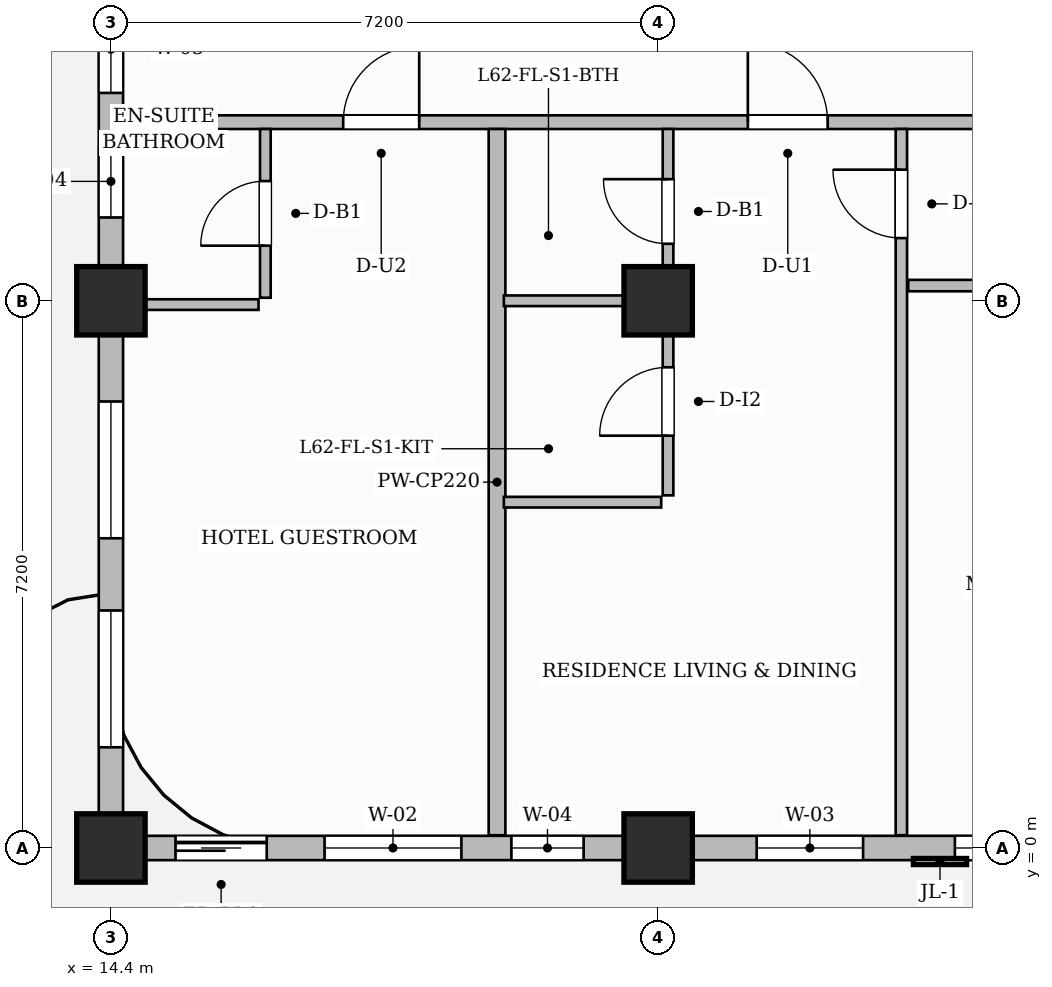
"""IFC4 building model, lengths in metres.
Left out: names, types, materials, properties, quantities, classifications, styles, units other than length and angle.
Written with IfcOpenShell. Run it as: python <this file> out.ifc"""

import sys

from ifc_helpers import new_model, si_unit, direction, frame, frame_2d, origin, origin_2d, place, context, subcontext, project, spatial, rectangle, extrude, source, transform, mapped, element, fill, save


model = new_model("IFC4")
c1 = context("Model", 3, precision=1e-05, world=origin(), true_north=direction((0.0, 1.0)))
c2 = subcontext(c1, "Body", "Model", "MODEL_VIEW")
j1 = project(units=[si_unit("LENGTHUNIT", "METRE"), si_unit("PLANEANGLEUNIT", "RADIAN")], contexts=[c1])
p1 = place(None, origin())
s1 = spatial("IfcSite", under=j1, at=p1, CompositionType="ELEMENT")
p2 = place(p1, origin())
s2 = spatial("IfcBuilding", under=s1, at=p2, CompositionType="ELEMENT")
p3 = place(p2, frame((0.0, 0.0, 248.1)))
s3 = spatial("IfcBuildingStorey", under=s2, at=p3, CompositionType="ELEMENT", Elevation=248.1)
m1 = source(origin(), c2, "Body", "SweptSolid", [
    extrude(rectangle(XDim=0.9, YDim=0.9, at=origin_2d()), origin(), (0.0, 0.0, 1.0), 3.85),
])
for number, where, z_axis, x_axis in (
    (1, (14.4, 0.0, 0.0), (0.0, 0.0, 1.0), (1.0, 0.0, 0.0)),
    (2, (14.4, 7.2, 0.0), (0.0, 0.0, 1.0), (1.0, 0.0, 0.0)),
    (3, (21.6, 0.0, 0.0), (0.0, 0.0, 1.0), (1.0, 0.0, 0.0)),
    (4, (21.6, 7.2, 0.0), (0.0, 0.0, 1.0), (1.0, 0.0, 0.0)),
):
    element("IfcColumn", number, at=place(p3, frame(where, z_axis=z_axis, x_axis=x_axis)), inside=s3, PredefinedType="COLUMN", context=c2, shape_type="MappedRepresentation", body=[
        mapped(m1, transform((0.0, 0.0, 0.0), scale=1.0)),
    ])
p4 = place(p3, frame((14.568, 9.55, 0.0), z_axis=(0.0, 0.0, 1.0), x_axis=(1.0, 0.0, 0.0)))
e5 = element("IfcWall", 5, at=p4, inside=s3, PredefinedType="PARTITIONING", context=c2, shape_type="SweptSolid", body=[
    extrude(rectangle(XDim=15.542, YDim=0.18, at=frame_2d((7.771, 0.0))), origin(), (0.0, 0.0, 1.0), 3.6),
])
p5 = place(p4, frame((2.888, 0.0, 0.0)))
e6 = element("IfcOpeningElement", 6, at=p5, cuts=e5, PredefinedType="OPENING", context=c2, shape_type="SweptSolid", body=[
    extrude(rectangle(XDim=1.0, YDim=2.2, at=frame_2d((0.5, 1.1))), frame((0.0, 0.1, 0.0), z_axis=(0.0, -1.0, 0.0), x_axis=(1.0, 0.0, 0.0)), (0.0, 0.0, 1.0), 0.2),
])
p6 = place(p4, frame((8.212, 0.0, 0.0)))
e7 = element("IfcOpeningElement", 7, at=p6, cuts=e5, PredefinedType="OPENING", context=c2, shape_type="SweptSolid", body=[
    extrude(rectangle(XDim=1.05, YDim=2.25, at=frame_2d((0.525, 1.125))), frame((0.0, 0.1, 0.0), z_axis=(0.0, -1.0, 0.0), x_axis=(1.0, 0.0, 0.0)), (0.0, 0.0, 1.0), 0.2),
])
p7 = place(p3, frame((19.48, 0.168, 0.0), z_axis=(0.0, 0.0, 1.0), x_axis=(0.0, 1.0, 0.0)))
e8 = element("IfcWall", 8, at=p7, inside=s3, PredefinedType="PARTITIONING", context=c2, shape_type="SweptSolid", body=[
    extrude(rectangle(XDim=9.292, YDim=0.22, at=frame_2d((4.646, 0.0))), origin(), (0.0, 0.0, 1.0), 3.6),
])
p8 = place(p3, frame((16.432, 7.24, 0.0), z_axis=(0.0, 0.0, 1.0), x_axis=(0.0, 1.0, 0.0)))
e9 = element("IfcWall", 9, at=p8, inside=s3, PredefinedType="PARTITIONING", context=c2, shape_type="SweptSolid", body=[
    extrude(rectangle(XDim=2.22, YDim=0.14, at=frame_2d((1.11, 0.0))), origin(), (0.0, 0.0, 1.0), 3.6),
])
p9 = place(p8, frame((0.685, 0.0, 0.0)))
e10 = element("IfcOpeningElement", 10, at=p9, cuts=e9, PredefinedType="OPENING", context=c2, shape_type="SweptSolid", body=[
    extrude(rectangle(XDim=0.85, YDim=2.1, at=frame_2d((0.425, 1.05))), frame((0.0, 0.08, 0.0), z_axis=(0.0, -1.0, 0.0), x_axis=(1.0, 0.0, 0.0)), (0.0, 0.0, 1.0), 0.16),
])
p10 = place(p3, frame((14.49, 7.15, 0.0), z_axis=(0.0, 0.0, 1.0), x_axis=(1.0, 0.0, 0.0)))
e11 = element("IfcWall", 11, at=p10, inside=s3, PredefinedType="PARTITIONING", context=c2, shape_type="SweptSolid", body=[
    extrude(rectangle(XDim=1.852, YDim=0.14, at=frame_2d((0.926, 0.0))), origin(), (0.0, 0.0, 1.0), 2.035),
])
p11 = place(p3, frame((21.73, 4.64, 0.0), z_axis=(0.0, 0.0, 1.0), x_axis=(0.0, 1.0, 0.0)))
e12 = element("IfcWall", 12, at=p11, inside=s3, PredefinedType="PARTITIONING", context=c2, shape_type="SweptSolid", body=[
    extrude(rectangle(XDim=4.82, YDim=0.14, at=frame_2d((2.41, 0.0))), origin(), (0.0, 0.0, 1.0), 3.135),
])
p12 = place(p11, frame((0.785, 0.0, 0.0)))
e13 = element("IfcOpeningElement", 13, at=p12, cuts=e12, PredefinedType="OPENING", context=c2, shape_type="SweptSolid", body=[
    extrude(rectangle(XDim=0.9, YDim=2.15, at=frame_2d((0.45, 1.075))), frame((0.0, 0.08, 0.0), z_axis=(0.0, -1.0, 0.0), x_axis=(1.0, 0.0, 0.0)), (0.0, 0.0, 1.0), 0.16),
])
p13 = place(p11, frame((3.31, 0.0, 0.0)))
e14 = element("IfcOpeningElement", 14, at=p13, cuts=e12, PredefinedType="OPENING", context=c2, shape_type="SweptSolid", body=[
    extrude(rectangle(XDim=0.85, YDim=2.1, at=frame_2d((0.425, 1.05))), frame((0.0, 0.08, 0.0), z_axis=(0.0, -1.0, 0.0), x_axis=(1.0, 0.0, 0.0)), (0.0, 0.0, 1.0), 0.16),
])
p14 = place(p3, frame((19.57, 7.2, 0.0), z_axis=(0.0, 0.0, 1.0), x_axis=(1.0, 0.0, 0.0)))
e15 = element("IfcWall", 15, at=p14, inside=s3, PredefinedType="PARTITIONING", context=c2, shape_type="SweptSolid", body=[
    extrude(rectangle(XDim=2.07, YDim=0.14, at=frame_2d((1.035, 0.0))), origin(), (0.0, 0.0, 1.0), 2.035),
])
p15 = place(p3, frame((19.57, 4.55, 0.0), z_axis=(0.0, 0.0, 1.0), x_axis=(1.0, 0.0, 0.0)))
e16 = element("IfcWall", 16, at=p15, inside=s3, PredefinedType="PARTITIONING", context=c2, shape_type="SweptSolid", body=[
    extrude(rectangle(XDim=2.07, YDim=0.14, at=frame_2d((1.035, 0.0))), origin(), (0.0, 0.0, 1.0), 3.6),
])
p16 = place(p3, frame((24.8, 0.168, 0.0), z_axis=(0.0, 0.0, 1.0), x_axis=(0.0, 1.0, 0.0)))
e17 = element("IfcWall", 17, at=p16, inside=s3, PredefinedType="PARTITIONING", context=c2, shape_type="SweptSolid", body=[
    extrude(rectangle(XDim=9.292, YDim=0.15, at=frame_2d((4.646, 0.0))), origin(), (0.0, 0.0, 1.0), 3.6),
])
p17 = place(p16, frame((7.857, 0.0, 0.0)))
e18 = element("IfcOpeningElement", 18, at=p17, cuts=e17, PredefinedType="OPENING", context=c2, shape_type="SweptSolid", body=[
    extrude(rectangle(XDim=0.9, YDim=2.15, at=frame_2d((0.45, 1.075))), frame((0.0, 0.085, 0.0), z_axis=(0.0, -1.0, 0.0), x_axis=(1.0, 0.0, 0.0)), (0.0, 0.0, 1.0), 0.17),
])
p18 = place(p3, frame((24.89, 7.4, 0.0), z_axis=(0.0, 0.0, 1.0), x_axis=(1.0, 0.0, 0.0)))
e19 = element("IfcWall", 19, at=p18, inside=s3, PredefinedType="PARTITIONING", context=c2, shape_type="SweptSolid", body=[
    extrude(rectangle(XDim=5.22, YDim=0.15, at=frame_2d((2.61, 0.0))), origin(), (0.0, 0.0, 1.0), 3.135),
])
p19 = place(p18, frame((1.11, 0.0, 0.0)))
e20 = element("IfcOpeningElement", 20, at=p19, cuts=e19, PredefinedType="OPENING", context=c2, shape_type="SweptSolid", body=[
    extrude(rectangle(XDim=0.9, YDim=2.15, at=frame_2d((0.45, 1.075))), frame((0.0, 0.085, 0.0), z_axis=(0.0, -1.0, 0.0), x_axis=(1.0, 0.0, 0.0)), (0.0, 0.0, 1.0), 0.17),
])
p20 = place(p3, frame((14.4, 0.0, 0.0), z_axis=(0.0, 0.0, 1.0), x_axis=(1.0, 0.0, 0.0)))
e21 = element("IfcWall", 21, at=p20, inside=s3, PredefinedType="SOLIDWALL", context=c2, shape_type="SweptSolid", body=[
    extrude(rectangle(XDim=35.4, YDim=0.32, at=frame_2d((17.7, 0.0))), origin(), (0.0, 0.0, 1.0), 3.135),
])
p21 = place(p20, frame((0.85, 0.0, 0.0)))
e22 = element("IfcOpeningElement", 22, at=p21, cuts=e21, PredefinedType="OPENING", context=c2, shape_type="SweptSolid", body=[
    extrude(rectangle(XDim=1.2, YDim=2.2, at=frame_2d((0.6, 1.1))), frame((0.0, 0.17, 0.0), z_axis=(0.0, -1.0, 0.0), x_axis=(1.0, 0.0, 0.0)), (0.0, 0.0, 1.0), 0.34),
])
p22 = place(p20, frame((2.811, 0.0, 0.8)))
e23 = element("IfcOpeningElement", 23, at=p22, cuts=e21, PredefinedType="OPENING", context=c2, shape_type="SweptSolid", body=[
    extrude(rectangle(XDim=1.8, YDim=1.85, at=frame_2d((0.9, 0.925))), frame((0.0, 0.17, 0.0), z_axis=(0.0, -1.0, 0.0), x_axis=(1.0, 0.0, 0.0)), (0.0, 0.0, 1.0), 0.34),
])
p23 = place(p20, frame((5.269, 0.0, 0.8)))
e24 = element("IfcOpeningElement", 24, at=p23, cuts=e21, PredefinedType="OPENING", context=c2, shape_type="SweptSolid", body=[
    extrude(rectangle(XDim=0.95, YDim=1.75, at=frame_2d((0.475, 0.875))), frame((0.0, 0.17, 0.0), z_axis=(0.0, -1.0, 0.0), x_axis=(1.0, 0.0, 0.0)), (0.0, 0.0, 1.0), 0.34),
])
p24 = place(p20, frame((8.496, 0.0, 0.8)))
e25 = element("IfcOpeningElement", 25, at=p24, cuts=e21, PredefinedType="OPENING", context=c2, shape_type="SweptSolid", body=[
    extrude(rectangle(XDim=1.4, YDim=1.85, at=frame_2d((0.7, 0.925))), frame((0.0, 0.17, 0.0), z_axis=(0.0, -1.0, 0.0), x_axis=(1.0, 0.0, 0.0)), (0.0, 0.0, 1.0), 0.34),
])
p25 = place(p20, frame((11.104, 0.0, 0.8)))
e26 = element("IfcOpeningElement", 26, at=p25, cuts=e21, PredefinedType="OPENING", context=c2, shape_type="SweptSolid", body=[
    extrude(rectangle(XDim=1.8, YDim=1.85, at=frame_2d((0.9, 0.925))), frame((0.0, 0.17, 0.0), z_axis=(0.0, -1.0, 0.0), x_axis=(1.0, 0.0, 0.0)), (0.0, 0.0, 1.0), 0.34),
])
p26 = place(p20, frame((16.804, 0.0, 0.8)))
e27 = element("IfcOpeningElement", 27, at=p26, cuts=e21, PredefinedType="OPENING", context=c2, shape_type="SweptSolid", body=[
    extrude(rectangle(XDim=1.8, YDim=1.85, at=frame_2d((0.9, 0.925))), frame((0.0, 0.17, 0.0), z_axis=(0.0, -1.0, 0.0), x_axis=(1.0, 0.0, 0.0)), (0.0, 0.0, 1.0), 0.34),
])
p27 = place(p20, frame((21.725, 0.0, 0.8)))
e28 = element("IfcOpeningElement", 28, at=p27, cuts=e21, PredefinedType="OPENING", context=c2, shape_type="SweptSolid", body=[
    extrude(rectangle(XDim=1.8, YDim=1.85, at=frame_2d((0.9, 0.925))), frame((0.0, 0.17, 0.0), z_axis=(0.0, -1.0, 0.0), x_axis=(1.0, 0.0, 0.0)), (0.0, 0.0, 1.0), 0.34),
])
p28 = place(p20, frame((24.475, 0.0, 0.8)))
e29 = element("IfcOpeningElement", 29, at=p28, cuts=e21, PredefinedType="OPENING", context=c2, shape_type="SweptSolid", body=[
    extrude(rectangle(XDim=1.8, YDim=1.85, at=frame_2d((0.9, 0.925))), frame((0.0, 0.17, 0.0), z_axis=(0.0, -1.0, 0.0), x_axis=(1.0, 0.0, 0.0)), (0.0, 0.0, 1.0), 0.34),
])
p29 = place(p20, frame((29.075, 0.0, 0.8)))
e30 = element("IfcOpeningElement", 30, at=p29, cuts=e21, PredefinedType="OPENING", context=c2, shape_type="SweptSolid", body=[
    extrude(rectangle(XDim=1.8, YDim=1.85, at=frame_2d((0.9, 0.925))), frame((0.0, 0.17, 0.0), z_axis=(0.0, -1.0, 0.0), x_axis=(1.0, 0.0, 0.0)), (0.0, 0.0, 1.0), 0.34),
])
p30 = place(p20, frame((32.125, 0.0, 0.8)))
e31 = element("IfcOpeningElement", 31, at=p30, cuts=e21, PredefinedType="OPENING", context=c2, shape_type="SweptSolid", body=[
    extrude(rectangle(XDim=1.8, YDim=1.85, at=frame_2d((0.9, 0.925))), frame((0.0, 0.17, 0.0), z_axis=(0.0, -1.0, 0.0), x_axis=(1.0, 0.0, 0.0)), (0.0, 0.0, 1.0), 0.34),
])
p31 = place(p3, frame((14.4, 0.05, 0.0), z_axis=(0.0, 0.0, 1.0), x_axis=(0.0, 1.0, 0.0)))
e32 = element("IfcWall", 32, at=p31, inside=s3, PredefinedType="SOLIDWALL", context=c2, shape_type="SweptSolid", body=[
    extrude(rectangle(XDim=21.5, YDim=0.32, at=frame_2d((10.75, 0.0))), origin(), (0.0, 0.0, 1.0), 3.6),
])
p32 = place(p31, frame((1.275, 0.0, 0.8)))
e33 = element("IfcOpeningElement", 33, at=p32, cuts=e32, PredefinedType="OPENING", context=c2, shape_type="SweptSolid", body=[
    extrude(rectangle(XDim=1.8, YDim=1.85, at=frame_2d((0.9, 0.925))), frame((0.0, 0.17, 0.0), z_axis=(0.0, -1.0, 0.0), x_axis=(1.0, 0.0, 0.0)), (0.0, 0.0, 1.0), 0.34),
])
p33 = place(p31, frame((4.025, 0.0, 0.8)))
e34 = element("IfcOpeningElement", 34, at=p33, cuts=e32, PredefinedType="OPENING", context=c2, shape_type="SweptSolid", body=[
    extrude(rectangle(XDim=1.8, YDim=1.85, at=frame_2d((0.9, 0.925))), frame((0.0, 0.17, 0.0), z_axis=(0.0, -1.0, 0.0), x_axis=(1.0, 0.0, 0.0)), (0.0, 0.0, 1.0), 0.34),
])
p34 = place(p31, frame((8.246, 0.0, 0.8)))
e35 = element("IfcOpeningElement", 35, at=p34, cuts=e32, PredefinedType="OPENING", context=c2, shape_type="SweptSolid", body=[
    extrude(rectangle(XDim=0.95, YDim=1.75, at=frame_2d((0.475, 0.875))), frame((0.0, 0.17, 0.0), z_axis=(0.0, -1.0, 0.0), x_axis=(1.0, 0.0, 0.0)), (0.0, 0.0, 1.0), 0.34),
])
p35 = place(p31, frame((9.885, 0.0, 0.8)))
e36 = element("IfcOpeningElement", 36, at=p35, cuts=e32, PredefinedType="OPENING", context=c2, shape_type="SweptSolid", body=[
    extrude(rectangle(XDim=1.15, YDim=1.8, at=frame_2d((0.575, 0.9))), frame((0.0, 0.17, 0.0), z_axis=(0.0, -1.0, 0.0), x_axis=(1.0, 0.0, 0.0)), (0.0, 0.0, 1.0), 0.34),
])
p36 = place(p31, frame((11.789, 0.0, 0.8)))
e37 = element("IfcOpeningElement", 37, at=p36, cuts=e32, PredefinedType="OPENING", context=c2, shape_type="SweptSolid", body=[
    extrude(rectangle(XDim=1.4, YDim=1.85, at=frame_2d((0.7, 0.925))), frame((0.0, 0.17, 0.0), z_axis=(0.0, -1.0, 0.0), x_axis=(1.0, 0.0, 0.0)), (0.0, 0.0, 1.0), 0.34),
])
p37 = place(p31, frame((15.675, 0.0, 0.8)))
e38 = element("IfcOpeningElement", 38, at=p37, cuts=e32, PredefinedType="OPENING", context=c2, shape_type="SweptSolid", body=[
    extrude(rectangle(XDim=1.8, YDim=1.85, at=frame_2d((0.9, 0.925))), frame((0.0, 0.17, 0.0), z_axis=(0.0, -1.0, 0.0), x_axis=(1.0, 0.0, 0.0)), (0.0, 0.0, 1.0), 0.34),
])
p38 = place(p31, frame((18.425, 0.0, 0.8)))
e39 = element("IfcOpeningElement", 39, at=p38, cuts=e32, PredefinedType="OPENING", context=c2, shape_type="SweptSolid", body=[
    extrude(rectangle(XDim=1.8, YDim=1.85, at=frame_2d((0.9, 0.925))), frame((0.0, 0.17, 0.0), z_axis=(0.0, -1.0, 0.0), x_axis=(1.0, 0.0, 0.0)), (0.0, 0.0, 1.0), 0.34),
])
m2 = source(origin(), c2, "Body", "SweptSolid", [
    extrude(rectangle(XDim=0.85, YDim=2.1, at=frame_2d((0.425, 1.05))), frame((0.0, 0.025, 0.0), z_axis=(0.0, -1.0, 0.0), x_axis=(1.0, 0.0, 0.0)), (0.0, 0.0, 1.0), 0.05),
])
p39 = place(p9, origin())
e40 = element("IfcDoor", 40, at=p39, inside=s3, OperationType="SINGLE_SWING_LEFT", PredefinedType="DOOR", context=c2, shape_type="MappedRepresentation", body=[
    mapped(m2, transform((0.0, 0.0, 0.0), scale=1.0)),
])
fill(e10, e40)
m3 = source(origin(), c2, "Body", "SweptSolid", [
    extrude(rectangle(XDim=1.0, YDim=2.2, at=frame_2d((0.5, 1.1))), frame((0.0, 0.025, 0.0), z_axis=(0.0, -1.0, 0.0), x_axis=(1.0, 0.0, 0.0)), (0.0, 0.0, 1.0), 0.05),
])
p40 = place(p5, origin())
e41 = element("IfcDoor", 41, at=p40, inside=s3, OperationType="SINGLE_SWING_RIGHT", PredefinedType="DOOR", context=c2, shape_type="MappedRepresentation", body=[
    mapped(m3, transform((0.0, 0.0, 0.0), scale=1.0)),
])
fill(e6, e41)
m4 = source(origin(), c2, "Body", "SweptSolid", [
    extrude(rectangle(XDim=0.9, YDim=2.15, at=frame_2d((0.45, 1.075))), frame((0.0, 0.025, 0.0), z_axis=(0.0, -1.0, 0.0), x_axis=(1.0, 0.0, 0.0)), (0.0, 0.0, 1.0), 0.05),
])
p41 = place(p12, origin())
e42 = element("IfcDoor", 42, at=p41, inside=s3, OperationType="SINGLE_SWING_LEFT", PredefinedType="DOOR", context=c2, shape_type="MappedRepresentation", body=[
    mapped(m4, transform((0.0, 0.0, 0.0), scale=1.0)),
])
fill(e13, e42)
p42 = place(p13, origin())
e43 = element("IfcDoor", 43, at=p42, inside=s3, OperationType="SINGLE_SWING_RIGHT", PredefinedType="DOOR", context=c2, shape_type="MappedRepresentation", body=[
    mapped(m2, transform((0.0, 0.0, 0.0), scale=1.0)),
])
fill(e14, e43)
m5 = source(origin(), c2, "Body", "SweptSolid", [
    extrude(rectangle(XDim=1.05, YDim=2.25, at=frame_2d((0.525, 1.125))), frame((0.0, 0.025, 0.0), z_axis=(0.0, -1.0, 0.0), x_axis=(1.0, 0.0, 0.0)), (0.0, 0.0, 1.0), 0.05),
])
p43 = place(p6, origin())
e44 = element("IfcDoor", 44, at=p43, inside=s3, OperationType="SINGLE_SWING_LEFT", PredefinedType="DOOR", context=c2, shape_type="MappedRepresentation", body=[
    mapped(m5, transform((0.0, 0.0, 0.0), scale=1.0)),
])
fill(e7, e44)
p44 = place(p17, origin())
e45 = element("IfcDoor", 45, at=p44, inside=s3, OperationType="SINGLE_SWING_RIGHT", PredefinedType="DOOR", context=c2, shape_type="MappedRepresentation", body=[
    mapped(m4, transform((0.0, 0.0, 0.0), scale=1.0)),
])
fill(e18, e45)
m6 = source(origin(), c2, "Body", "SweptSolid", [
    extrude(rectangle(XDim=1.2, YDim=2.2, at=frame_2d((0.6, 1.1))), frame((0.0, 0.025, 0.0), z_axis=(0.0, -1.0, 0.0), x_axis=(1.0, 0.0, 0.0)), (0.0, 0.0, 1.0), 0.05),
])
p45 = place(p21, origin())
e46 = element("IfcDoor", 46, at=p45, inside=s3, OperationType="SLIDING_TO_LEFT", PredefinedType="DOOR", context=c2, shape_type="MappedRepresentation", body=[
    mapped(m6, transform((0.0, 0.0, 0.0), scale=1.0)),
])
fill(e22, e46)
m7 = source(origin(), c2, "Body", "SweptSolid", [
    extrude(rectangle(XDim=1.8, YDim=1.85, at=frame_2d((0.9, 0.925))), frame((0.0, 0.03, 0.0), z_axis=(0.0, -1.0, 0.0), x_axis=(1.0, 0.0, 0.0)), (0.0, 0.0, 1.0), 0.06),
])
p46 = place(p22, origin())
e47 = element("IfcWindow", 47, at=p46, inside=s3, PartitioningType="DOUBLE_PANEL_VERTICAL", PredefinedType="WINDOW", context=c2, shape_type="MappedRepresentation", body=[
    mapped(m7, transform((0.0, 0.0, 0.0), scale=1.0)),
])
fill(e23, e47)
m8 = source(origin(), c2, "Body", "SweptSolid", [
    extrude(rectangle(XDim=0.95, YDim=1.75, at=frame_2d((0.475, 0.875))), frame((0.0, 0.03, 0.0), z_axis=(0.0, -1.0, 0.0), x_axis=(1.0, 0.0, 0.0)), (0.0, 0.0, 1.0), 0.06),
])
p47 = place(p23, origin())
e48 = element("IfcWindow", 48, at=p47, inside=s3, PartitioningType="SINGLE_PANEL", PredefinedType="WINDOW", context=c2, shape_type="MappedRepresentation", body=[
    mapped(m8, transform((0.0, 0.0, 0.0), scale=1.0)),
])
fill(e24, e48)
m9 = source(origin(), c2, "Body", "SweptSolid", [
    extrude(rectangle(XDim=1.4, YDim=1.85, at=frame_2d((0.7, 0.925))), frame((0.0, 0.03, 0.0), z_axis=(0.0, -1.0, 0.0), x_axis=(1.0, 0.0, 0.0)), (0.0, 0.0, 1.0), 0.06),
])
p48 = place(p24, origin())
e49 = element("IfcWindow", 49, at=p48, inside=s3, PartitioningType="SINGLE_PANEL", PredefinedType="WINDOW", context=c2, shape_type="MappedRepresentation", body=[
    mapped(m9, transform((0.0, 0.0, 0.0), scale=1.0)),
])
fill(e25, e49)
p49 = place(p25, origin())
e50 = element("IfcWindow", 50, at=p49, inside=s3, PartitioningType="DOUBLE_PANEL_VERTICAL", PredefinedType="WINDOW", context=c2, shape_type="MappedRepresentation", body=[
    mapped(m7, transform((0.0, 0.0, 0.0), scale=1.0)),
])
fill(e26, e50)
p50 = place(p32, origin())
e51 = element("IfcWindow", 51, at=p50, inside=s3, PartitioningType="DOUBLE_PANEL_VERTICAL", PredefinedType="WINDOW", context=c2, shape_type="MappedRepresentation", body=[
    mapped(m7, transform((0.0, 0.0, 0.0), scale=1.0)),
])
fill(e33, e51)
p51 = place(p33, origin())
e52 = element("IfcWindow", 52, at=p51, inside=s3, PartitioningType="DOUBLE_PANEL_VERTICAL", PredefinedType="WINDOW", context=c2, shape_type="MappedRepresentation", body=[
    mapped(m7, transform((0.0, 0.0, 0.0), scale=1.0)),
])
fill(e34, e52)
p52 = place(p34, origin())
e53 = element("IfcWindow", 53, at=p52, inside=s3, PartitioningType="SINGLE_PANEL", PredefinedType="WINDOW", context=c2, shape_type="MappedRepresentation", body=[
    mapped(m8, transform((0.0, 0.0, 0.0), scale=1.0)),
])
fill(e35, e53)
m10 = source(origin(), c2, "Body", "SweptSolid", [
    extrude(rectangle(XDim=1.15, YDim=1.8, at=frame_2d((0.575, 0.9))), frame((0.0, 0.03, 0.0), z_axis=(0.0, -1.0, 0.0), x_axis=(1.0, 0.0, 0.0)), (0.0, 0.0, 1.0), 0.06),
])
p53 = place(p35, origin())
e54 = element("IfcWindow", 54, at=p53, inside=s3, PartitioningType="SINGLE_PANEL", PredefinedType="WINDOW", context=c2, shape_type="MappedRepresentation", body=[
    mapped(m10, transform((0.0, 0.0, 0.0), scale=1.0)),
])
fill(e36, e54)
save(model, sys.argv[1])
